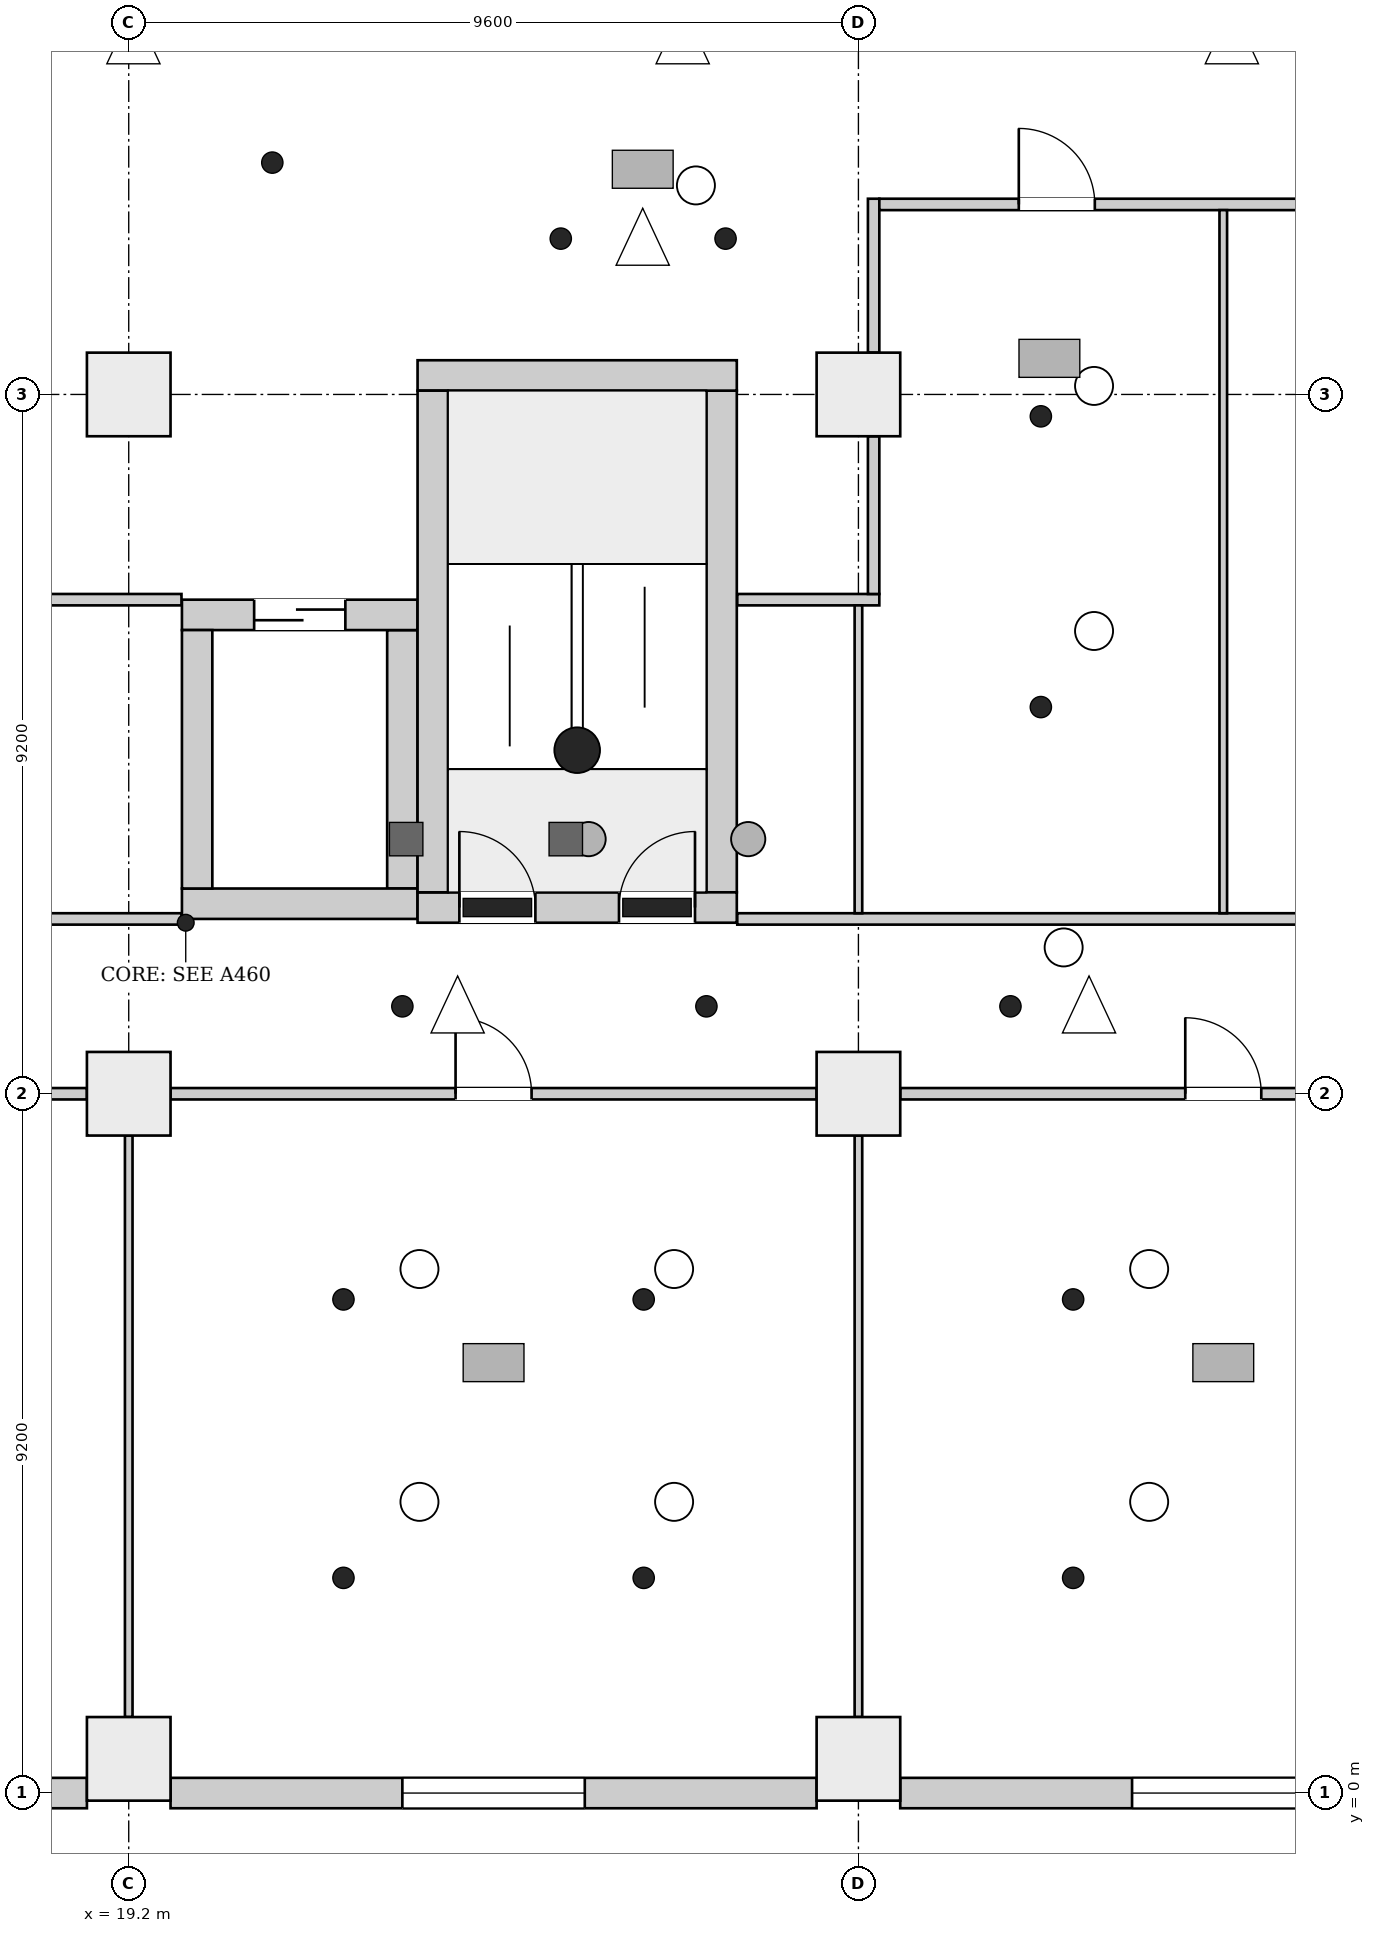
"""IFC4 building model, lengths in metres.
Left out: names, types, materials, properties, quantities, classifications, styles, units other than length and angle.
Written with IfcOpenShell. Run it as: python <this file> out.ifc"""

import sys

from ifc_helpers import new_model, si_unit, direction, frame, frame_2d, origin, origin_2d, place, context, subcontext, project, spatial, rectangle, extrude, element, fill, save


model = new_model("IFC4")
c1 = context("Model", 3, precision=1e-05, world=origin(), true_north=direction((0.0, 1.0)))
c2 = subcontext(c1, "Body", "Model", "MODEL_VIEW")
j1 = project(units=[si_unit("LENGTHUNIT", "METRE"), si_unit("PLANEANGLEUNIT", "RADIAN")], contexts=[c1])
p1 = place(None, origin())
s1 = spatial("IfcSite", under=j1, at=p1, CompositionType="ELEMENT")
p2 = place(p1, origin())
s2 = spatial("IfcBuilding", under=s1, at=p2, CompositionType="ELEMENT")
p3 = place(p2, frame((0.0, 0.0, 26.7)))
s3 = spatial("IfcBuildingStorey", under=s2, at=p3, CompositionType="ELEMENT", Elevation=26.7)
p4 = place(p3, frame((23.0, 11.65, 0.0), z_axis=(0.0, 0.0, 1.0), x_axis=(1.0, 0.0, 0.0)))
e1 = element("IfcWall", 1, at=p4, inside=s3, PredefinedType="SHEAR", context=c2, shape_type="SweptSolid", body=[
    extrude(rectangle(XDim=4.2, YDim=0.4, at=frame_2d((2.1, 0.0))), origin(), (0.0, 0.0, 1.0), 5.2),
])
p5 = place(p4, frame((0.55, 0.0, 0.0)))
e2 = element("IfcOpeningElement", 2, at=p5, cuts=e1, PredefinedType="OPENING", context=c2, shape_type="SweptSolid", body=[
    extrude(rectangle(XDim=1.0, YDim=2.1, at=frame_2d((0.5, 1.05))), frame((0.0, 0.21, 0.0), z_axis=(0.0, -1.0, 0.0), x_axis=(1.0, 0.0, 0.0)), (0.0, 0.0, 1.0), 0.42),
])
p6 = place(p4, frame((2.65, 0.0, 0.0)))
e3 = element("IfcOpeningElement", 3, at=p6, cuts=e1, PredefinedType="OPENING", context=c2, shape_type="SweptSolid", body=[
    extrude(rectangle(XDim=1.0, YDim=2.1, at=frame_2d((0.5, 1.05))), frame((0.0, 0.21, 0.0), z_axis=(0.0, -1.0, 0.0), x_axis=(1.0, 0.0, 0.0)), (0.0, 0.0, 1.0), 0.42),
])
p7 = place(p3, frame((23.0, 18.65, 0.0), z_axis=(0.0, 0.0, 1.0), x_axis=(1.0, 0.0, 0.0)))
e4 = element("IfcWall", 4, at=p7, inside=s3, PredefinedType="SHEAR", context=c2, shape_type="SweptSolid", body=[
    extrude(rectangle(XDim=4.2, YDim=0.4, at=frame_2d((2.1, 0.0))), origin(), (0.0, 0.0, 1.0), 5.2),
])
for number, where, z_axis, x_axis in (
    (5, (23.2, 11.85, 0.0), (0.0, 0.0, 1.0), (0.0, 1.0, 0.0)),
    (6, (27.0, 11.85, 0.0), (0.0, 0.0, 1.0), (0.0, 1.0, 0.0)),
):
    element("IfcWall", number, at=place(p3, frame(where, z_axis=z_axis, x_axis=x_axis)), inside=s3, PredefinedType="SHEAR", context=c2, shape_type="SweptSolid", body=[
        extrude(rectangle(XDim=6.6, YDim=0.4, at=frame_2d((3.3, 0.0))), origin(), (0.0, 0.0, 1.0), 5.2),
    ])
p8 = place(p3, frame((19.9, 11.7, 0.0), z_axis=(0.0, 0.0, 1.0), x_axis=(1.0, 0.0, 0.0)))
e7 = element("IfcWall", 7, at=p8, inside=s3, PredefinedType="SHEAR", context=c2, shape_type="SweptSolid", body=[
    extrude(rectangle(XDim=3.1, YDim=0.4, at=frame_2d((1.55, 0.0))), origin(), (0.0, 0.0, 1.0), 5.2),
])
p9 = place(p3, frame((19.9, 15.5, 0.0), z_axis=(0.0, 0.0, 1.0), x_axis=(1.0, 0.0, 0.0)))
e8 = element("IfcWall", 8, at=p9, inside=s3, PredefinedType="SHEAR", context=c2, shape_type="SweptSolid", body=[
    extrude(rectangle(XDim=3.1, YDim=0.4, at=frame_2d((1.55, 0.0))), origin(), (0.0, 0.0, 1.0), 5.2),
])
p10 = place(p9, frame((0.95, 0.0, 0.0)))
e9 = element("IfcOpeningElement", 9, at=p10, cuts=e8, PredefinedType="OPENING", context=c2, shape_type="SweptSolid", body=[
    extrude(rectangle(XDim=1.2, YDim=2.1, at=frame_2d((0.6, 1.05))), frame((0.0, 0.21, 0.0), z_axis=(0.0, -1.0, 0.0), x_axis=(1.0, 0.0, 0.0)), (0.0, 0.0, 1.0), 0.42),
])
for number, where, z_axis, x_axis in (
    (10, (20.1, 11.9, 0.0), (0.0, 0.0, 1.0), (0.0, 1.0, 0.0)),
    (11, (22.8, 11.9, 0.0), (0.0, 0.0, 1.0), (0.0, 1.0, 0.0)),
):
    element("IfcWall", number, at=place(p3, frame(where, z_axis=z_axis, x_axis=x_axis)), inside=s3, PredefinedType="SHEAR", context=c2, shape_type="SweptSolid", body=[
        extrude(rectangle(XDim=3.4, YDim=0.4, at=frame_2d((1.7, 0.0))), origin(), (0.0, 0.0, 1.0), 5.2),
    ])
for number, where, z_axis, x_axis in (
    (12, (19.2, 0.45, 0.0), (0.0, 0.0, 1.0), (1.0, 0.0, 0.0)),
    (13, (28.8, 0.45, 0.0), (0.0, 0.0, 1.0), (1.0, 0.0, 0.0)),
    (14, (19.2, 9.2, 0.0), (0.0, 0.0, 1.0), (1.0, 0.0, 0.0)),
    (15, (28.8, 9.2, 0.0), (0.0, 0.0, 1.0), (1.0, 0.0, 0.0)),
    (16, (19.2, 18.4, 0.0), (0.0, 0.0, 1.0), (1.0, 0.0, 0.0)),
    (17, (28.8, 18.4, 0.0), (0.0, 0.0, 1.0), (1.0, 0.0, 0.0)),
):
    element("IfcColumn", number, at=place(p3, frame(where, z_axis=z_axis, x_axis=x_axis)), inside=s3, PredefinedType="COLUMN", context=c2, shape_type="SweptSolid", body=[
        extrude(rectangle(XDim=1.1, YDim=1.1, at=origin_2d()), origin(), (0.0, 0.0, 1.0), 5.2),
    ])
p11 = place(p3, frame((10.15, 0.0, 0.0), z_axis=(0.0, 0.0, 1.0), x_axis=(1.0, 0.0, 0.0)))
e18 = element("IfcWall", 18, at=p11, inside=s3, PredefinedType="ELEMENTEDWALL", context=c2, shape_type="SweptSolid", body=[
    extrude(rectangle(XDim=8.5, YDim=0.4, at=frame_2d((4.25, 0.0))), origin(), (0.0, 0.0, 1.0), 4.85),
])
p12 = place(p11, frame((3.05, 0.0, 1.0)))
e19 = element("IfcOpeningElement", 19, at=p12, cuts=e18, PredefinedType="OPENING", context=c2, shape_type="SweptSolid", body=[
    extrude(rectangle(XDim=2.4, YDim=2.2, at=frame_2d((1.2, 1.1))), frame((0.0, 0.21, 0.0), z_axis=(0.0, -1.0, 0.0), x_axis=(1.0, 0.0, 0.0)), (0.0, 0.0, 1.0), 0.42),
])
p13 = place(p3, frame((19.75, 0.0, 0.0), z_axis=(0.0, 0.0, 1.0), x_axis=(1.0, 0.0, 0.0)))
e20 = element("IfcWall", 20, at=p13, inside=s3, PredefinedType="ELEMENTEDWALL", context=c2, shape_type="SweptSolid", body=[
    extrude(rectangle(XDim=8.5, YDim=0.4, at=frame_2d((4.25, 0.0))), origin(), (0.0, 0.0, 1.0), 4.85),
])
p14 = place(p13, frame((3.05, 0.0, 1.0)))
e21 = element("IfcOpeningElement", 21, at=p14, cuts=e20, PredefinedType="OPENING", context=c2, shape_type="SweptSolid", body=[
    extrude(rectangle(XDim=2.4, YDim=2.2, at=frame_2d((1.2, 1.1))), frame((0.0, 0.21, 0.0), z_axis=(0.0, -1.0, 0.0), x_axis=(1.0, 0.0, 0.0)), (0.0, 0.0, 1.0), 0.42),
])
p15 = place(p3, frame((29.35, 0.0, 0.0), z_axis=(0.0, 0.0, 1.0), x_axis=(1.0, 0.0, 0.0)))
e22 = element("IfcWall", 22, at=p15, inside=s3, PredefinedType="ELEMENTEDWALL", context=c2, shape_type="SweptSolid", body=[
    extrude(rectangle(XDim=8.5, YDim=0.4, at=frame_2d((4.25, 0.0))), origin(), (0.0, 0.0, 1.0), 4.85),
])
p16 = place(p15, frame((3.05, 0.0, 1.0)))
e23 = element("IfcOpeningElement", 23, at=p16, cuts=e22, PredefinedType="OPENING", context=c2, shape_type="SweptSolid", body=[
    extrude(rectangle(XDim=2.4, YDim=2.2, at=frame_2d((1.2, 1.1))), frame((0.0, 0.21, 0.0), z_axis=(0.0, -1.0, 0.0), x_axis=(1.0, 0.0, 0.0)), (0.0, 0.0, 1.0), 0.42),
])
p17 = place(p3, frame((10.15, 9.2, 0.0), z_axis=(0.0, 0.0, 1.0), x_axis=(1.0, 0.0, 0.0)))
e24 = element("IfcWall", 24, at=p17, inside=s3, PredefinedType="PARTITIONING", context=c2, shape_type="SweptSolid", body=[
    extrude(rectangle(XDim=8.5, YDim=0.15, at=frame_2d((4.25, 0.0))), origin(), (0.0, 0.0, 1.0), 4.45),
])
p18 = place(p17, frame((3.75, 0.0, 0.0)))
e25 = element("IfcOpeningElement", 25, at=p18, cuts=e24, PredefinedType="OPENING", context=c2, shape_type="SweptSolid", body=[
    extrude(rectangle(XDim=1.0, YDim=2.1, at=frame_2d((0.5, 1.05))), frame((0.0, 0.085, 0.0), z_axis=(0.0, -1.0, 0.0), x_axis=(1.0, 0.0, 0.0)), (0.0, 0.0, 1.0), 0.17),
])
p19 = place(p3, frame((10.325, 11.5, 0.0), z_axis=(0.0, 0.0, 1.0), x_axis=(1.0, 0.0, 0.0)))
e26 = element("IfcWall", 26, at=p19, inside=s3, PredefinedType="PARTITIONING", context=c2, shape_type="SweptSolid", body=[
    extrude(rectangle(XDim=9.569, YDim=0.15, at=frame_2d((4.785, 0.0))), origin(), (0.0, 0.0, 1.0), 4.85),
])
p20 = place(p3, frame((16.206, 15.7, 0.0), z_axis=(0.0, 0.0, 1.0), x_axis=(1.0, 0.0, 0.0)))
e27 = element("IfcWall", 27, at=p20, inside=s3, PredefinedType="PARTITIONING", context=c2, shape_type="SweptSolid", body=[
    extrude(rectangle(XDim=3.688, YDim=0.15, at=frame_2d((1.844, 0.0))), origin(), (0.0, 0.0, 1.0), 4.85),
])
p21 = place(p3, frame((19.2, 1.0, 0.0), z_axis=(0.0, 0.0, 1.0), x_axis=(0.0, 1.0, 0.0)))
e28 = element("IfcWall", 28, at=p21, inside=s3, PredefinedType="PARTITIONING", context=c2, shape_type="SweptSolid", body=[
    extrude(rectangle(XDim=7.65, YDim=0.1, at=frame_2d((3.825, 0.0))), origin(), (0.0, 0.0, 1.0), 4.45),
])
p22 = place(p3, frame((19.75, 9.2, 0.0), z_axis=(0.0, 0.0, 1.0), x_axis=(1.0, 0.0, 0.0)))
e29 = element("IfcWall", 29, at=p22, inside=s3, PredefinedType="PARTITIONING", context=c2, shape_type="SweptSolid", body=[
    extrude(rectangle(XDim=8.5, YDim=0.15, at=frame_2d((4.25, 0.0))), origin(), (0.0, 0.0, 1.0), 4.45),
])
p23 = place(p22, frame((3.75, 0.0, 0.0)))
e30 = element("IfcOpeningElement", 30, at=p23, cuts=e29, PredefinedType="OPENING", context=c2, shape_type="SweptSolid", body=[
    extrude(rectangle(XDim=1.0, YDim=2.1, at=frame_2d((0.5, 1.05))), frame((0.0, 0.085, 0.0), z_axis=(0.0, -1.0, 0.0), x_axis=(1.0, 0.0, 0.0)), (0.0, 0.0, 1.0), 0.17),
])
p24 = place(p3, frame((27.206, 11.5, 0.0), z_axis=(0.0, 0.0, 1.0), x_axis=(1.0, 0.0, 0.0)))
e31 = element("IfcWall", 31, at=p24, inside=s3, PredefinedType="PARTITIONING", context=c2, shape_type="SweptSolid", body=[
    extrude(rectangle(XDim=25.669, YDim=0.15, at=frame_2d((12.834, 0.0))), origin(), (0.0, 0.0, 1.0), 4.85),
])
p25 = place(p24, frame((13.094, 0.0, 0.0)))
e32 = element("IfcOpeningElement", 32, at=p25, cuts=e31, PredefinedType="OPENING", context=c2, shape_type="SweptSolid", body=[
    extrude(rectangle(XDim=1.0, YDim=2.1, at=frame_2d((0.5, 1.05))), frame((0.0, 0.085, 0.0), z_axis=(0.0, -1.0, 0.0), x_axis=(1.0, 0.0, 0.0)), (0.0, 0.0, 1.0), 0.17),
])
p26 = place(p24, frame((17.894, 0.0, 0.0)))
e33 = element("IfcOpeningElement", 33, at=p26, cuts=e31, PredefinedType="OPENING", context=c2, shape_type="SweptSolid", body=[
    extrude(rectangle(XDim=1.0, YDim=2.1, at=frame_2d((0.5, 1.05))), frame((0.0, 0.085, 0.0), z_axis=(0.0, -1.0, 0.0), x_axis=(1.0, 0.0, 0.0)), (0.0, 0.0, 1.0), 0.17),
])
p27 = place(p24, frame((22.659, 0.0, 0.0)))
e34 = element("IfcOpeningElement", 34, at=p27, cuts=e31, PredefinedType="OPENING", context=c2, shape_type="SweptSolid", body=[
    extrude(rectangle(XDim=1.0, YDim=2.1, at=frame_2d((0.5, 1.05))), frame((0.0, 0.085, 0.0), z_axis=(0.0, -1.0, 0.0), x_axis=(1.0, 0.0, 0.0)), (0.0, 0.0, 1.0), 0.17),
])
p28 = place(p3, frame((27.206, 15.7, 0.0), z_axis=(0.0, 0.0, 1.0), x_axis=(1.0, 0.0, 0.0)))
e35 = element("IfcWall", 35, at=p28, inside=s3, PredefinedType="PARTITIONING", context=c2, shape_type="SweptSolid", body=[
    extrude(rectangle(XDim=1.869, YDim=0.15, at=frame_2d((0.935, 0.0))), origin(), (0.0, 0.0, 1.0), 4.85),
])
p29 = place(p3, frame((28.8, 1.0, 0.0), z_axis=(0.0, 0.0, 1.0), x_axis=(0.0, 1.0, 0.0)))
e36 = element("IfcWall", 36, at=p29, inside=s3, PredefinedType="PARTITIONING", context=c2, shape_type="SweptSolid", body=[
    extrude(rectangle(XDim=7.65, YDim=0.1, at=frame_2d((3.825, 0.0))), origin(), (0.0, 0.0, 1.0), 4.45),
])
p30 = place(p3, frame((28.8, 11.575, 0.0), z_axis=(0.0, 0.0, 1.0), x_axis=(0.0, 1.0, 0.0)))
e37 = element("IfcWall", 37, at=p30, inside=s3, PredefinedType="PARTITIONING", context=c2, shape_type="SweptSolid", body=[
    extrude(rectangle(XDim=4.05, YDim=0.1, at=frame_2d((2.025, 0.0))), origin(), (0.0, 0.0, 1.0), 4.45),
])
p31 = place(p3, frame((29.0, 15.775, 0.0), z_axis=(0.0, 0.0, 1.0), x_axis=(0.0, 1.0, 0.0)))
e38 = element("IfcWall", 38, at=p31, inside=s3, PredefinedType="PARTITIONING", context=c2, shape_type="SweptSolid", body=[
    extrude(rectangle(XDim=2.075, YDim=0.15, at=frame_2d((1.038, 0.0))), origin(), (0.0, 0.0, 1.0), 4.45),
])
p32 = place(p3, frame((29.0, 18.95, 0.0), z_axis=(0.0, 0.0, 1.0), x_axis=(0.0, 1.0, 0.0)))
e39 = element("IfcWall", 39, at=p32, inside=s3, PredefinedType="PARTITIONING", context=c2, shape_type="SweptSolid", body=[
    extrude(rectangle(XDim=2.025, YDim=0.15, at=frame_2d((1.013, 0.0))), origin(), (0.0, 0.0, 1.0), 4.45),
])
p33 = place(p3, frame((29.075, 20.9, 0.0), z_axis=(0.0, 0.0, 1.0), x_axis=(1.0, 0.0, 0.0)))
e40 = element("IfcWall", 40, at=p33, inside=s3, PredefinedType="PARTITIONING", context=c2, shape_type="SweptSolid", body=[
    extrude(rectangle(XDim=9.25, YDim=0.15, at=frame_2d((4.625, 0.0))), origin(), (0.0, 0.0, 1.0), 4.85),
])
p34 = place(p33, frame((1.835, 0.0, 0.0)))
e41 = element("IfcOpeningElement", 41, at=p34, cuts=e40, PredefinedType="OPENING", context=c2, shape_type="SweptSolid", body=[
    extrude(rectangle(XDim=1.0, YDim=2.1, at=frame_2d((0.5, 1.05))), frame((0.0, 0.085, 0.0), z_axis=(0.0, -1.0, 0.0), x_axis=(1.0, 0.0, 0.0)), (0.0, 0.0, 1.0), 0.17),
])
p35 = place(p33, frame((6.315, 0.0, 0.0)))
e42 = element("IfcOpeningElement", 42, at=p35, cuts=e40, PredefinedType="OPENING", context=c2, shape_type="SweptSolid", body=[
    extrude(rectangle(XDim=1.0, YDim=2.1, at=frame_2d((0.5, 1.05))), frame((0.0, 0.085, 0.0), z_axis=(0.0, -1.0, 0.0), x_axis=(1.0, 0.0, 0.0)), (0.0, 0.0, 1.0), 0.17),
])
p36 = place(p3, frame((29.35, 9.2, 0.0), z_axis=(0.0, 0.0, 1.0), x_axis=(1.0, 0.0, 0.0)))
e43 = element("IfcWall", 43, at=p36, inside=s3, PredefinedType="PARTITIONING", context=c2, shape_type="SweptSolid", body=[
    extrude(rectangle(XDim=8.5, YDim=0.15, at=frame_2d((4.25, 0.0))), origin(), (0.0, 0.0, 1.0), 4.45),
])
p37 = place(p36, frame((3.75, 0.0, 0.0)))
e44 = element("IfcOpeningElement", 44, at=p37, cuts=e43, PredefinedType="OPENING", context=c2, shape_type="SweptSolid", body=[
    extrude(rectangle(XDim=1.0, YDim=2.1, at=frame_2d((0.5, 1.05))), frame((0.0, 0.085, 0.0), z_axis=(0.0, -1.0, 0.0), x_axis=(1.0, 0.0, 0.0)), (0.0, 0.0, 1.0), 0.17),
])
p38 = place(p3, frame((33.6, 11.575, 0.0), z_axis=(0.0, 0.0, 1.0), x_axis=(0.0, 1.0, 0.0)))
e45 = element("IfcWall", 45, at=p38, inside=s3, PredefinedType="PARTITIONING", context=c2, shape_type="SweptSolid", body=[
    extrude(rectangle(XDim=9.25, YDim=0.1, at=frame_2d((4.625, 0.0))), origin(), (0.0, 0.0, 1.0), 4.85),
])
p39 = place(p14, origin())
e46 = element("IfcWindow", 46, at=p39, inside=s3, PartitioningType="SINGLE_PANEL", PredefinedType="WINDOW", context=c2, shape_type="SweptSolid", body=[
    extrude(rectangle(XDim=2.4, YDim=2.2, at=frame_2d((1.2, 1.1))), frame((0.0, 0.03, 0.0), z_axis=(0.0, -1.0, 0.0), x_axis=(1.0, 0.0, 0.0)), (0.0, 0.0, 1.0), 0.06),
])
fill(e21, e46)
p40 = place(p16, origin())
e47 = element("IfcWindow", 47, at=p40, inside=s3, PartitioningType="SINGLE_PANEL", PredefinedType="WINDOW", context=c2, shape_type="SweptSolid", body=[
    extrude(rectangle(XDim=2.4, YDim=2.2, at=frame_2d((1.2, 1.1))), frame((0.0, 0.03, 0.0), z_axis=(0.0, -1.0, 0.0), x_axis=(1.0, 0.0, 0.0)), (0.0, 0.0, 1.0), 0.06),
])
fill(e23, e47)
p41 = place(p5, origin())
e48 = element("IfcDoor", 48, at=p41, inside=s3, OperationType="SINGLE_SWING_RIGHT", PredefinedType="DOOR", context=c2, shape_type="SweptSolid", body=[
    extrude(rectangle(XDim=1.0, YDim=2.1, at=frame_2d((0.5, 1.05))), frame((0.0, 0.025, 0.0), z_axis=(0.0, -1.0, 0.0), x_axis=(1.0, 0.0, 0.0)), (0.0, 0.0, 1.0), 0.05),
])
fill(e2, e48)
p42 = place(p6, origin())
e49 = element("IfcDoor", 49, at=p42, inside=s3, OperationType="SINGLE_SWING_LEFT", PredefinedType="DOOR", context=c2, shape_type="SweptSolid", body=[
    extrude(rectangle(XDim=1.0, YDim=2.1, at=frame_2d((0.5, 1.05))), frame((0.0, 0.025, 0.0), z_axis=(0.0, -1.0, 0.0), x_axis=(1.0, 0.0, 0.0)), (0.0, 0.0, 1.0), 0.05),
])
fill(e3, e49)
p43 = place(p10, origin())
e50 = element("IfcDoor", 50, at=p43, inside=s3, OperationType="DOUBLE_DOOR_SLIDING", PredefinedType="DOOR", context=c2, shape_type="SweptSolid", body=[
    extrude(rectangle(XDim=1.2, YDim=2.1, at=frame_2d((0.6, 1.05))), frame((0.0, 0.025, 0.0), z_axis=(0.0, -1.0, 0.0), x_axis=(1.0, 0.0, 0.0)), (0.0, 0.0, 1.0), 0.05),
])
fill(e9, e50)
p44 = place(p34, origin())
e51 = element("IfcDoor", 51, at=p44, inside=s3, OperationType="SINGLE_SWING_RIGHT", PredefinedType="DOOR", context=c2, shape_type="SweptSolid", body=[
    extrude(rectangle(XDim=1.0, YDim=2.1, at=frame_2d((0.5, 1.05))), frame((0.0, 0.025, 0.0), z_axis=(0.0, -1.0, 0.0), x_axis=(1.0, 0.0, 0.0)), (0.0, 0.0, 1.0), 0.05),
])
fill(e41, e51)
p45 = place(p23, origin())
e52 = element("IfcDoor", 52, at=p45, inside=s3, OperationType="SINGLE_SWING_RIGHT", PredefinedType="DOOR", context=c2, shape_type="SweptSolid", body=[
    extrude(rectangle(XDim=1.0, YDim=2.1, at=frame_2d((0.5, 1.05))), frame((0.0, 0.025, 0.0), z_axis=(0.0, -1.0, 0.0), x_axis=(1.0, 0.0, 0.0)), (0.0, 0.0, 1.0), 0.05),
])
fill(e30, e52)
p46 = place(p37, origin())
e53 = element("IfcDoor", 53, at=p46, inside=s3, OperationType="SINGLE_SWING_RIGHT", PredefinedType="DOOR", context=c2, shape_type="SweptSolid", body=[
    extrude(rectangle(XDim=1.0, YDim=2.1, at=frame_2d((0.5, 1.05))), frame((0.0, 0.025, 0.0), z_axis=(0.0, -1.0, 0.0), x_axis=(1.0, 0.0, 0.0)), (0.0, 0.0, 1.0), 0.05),
])
fill(e44, e53)
save(model, sys.argv[1])
